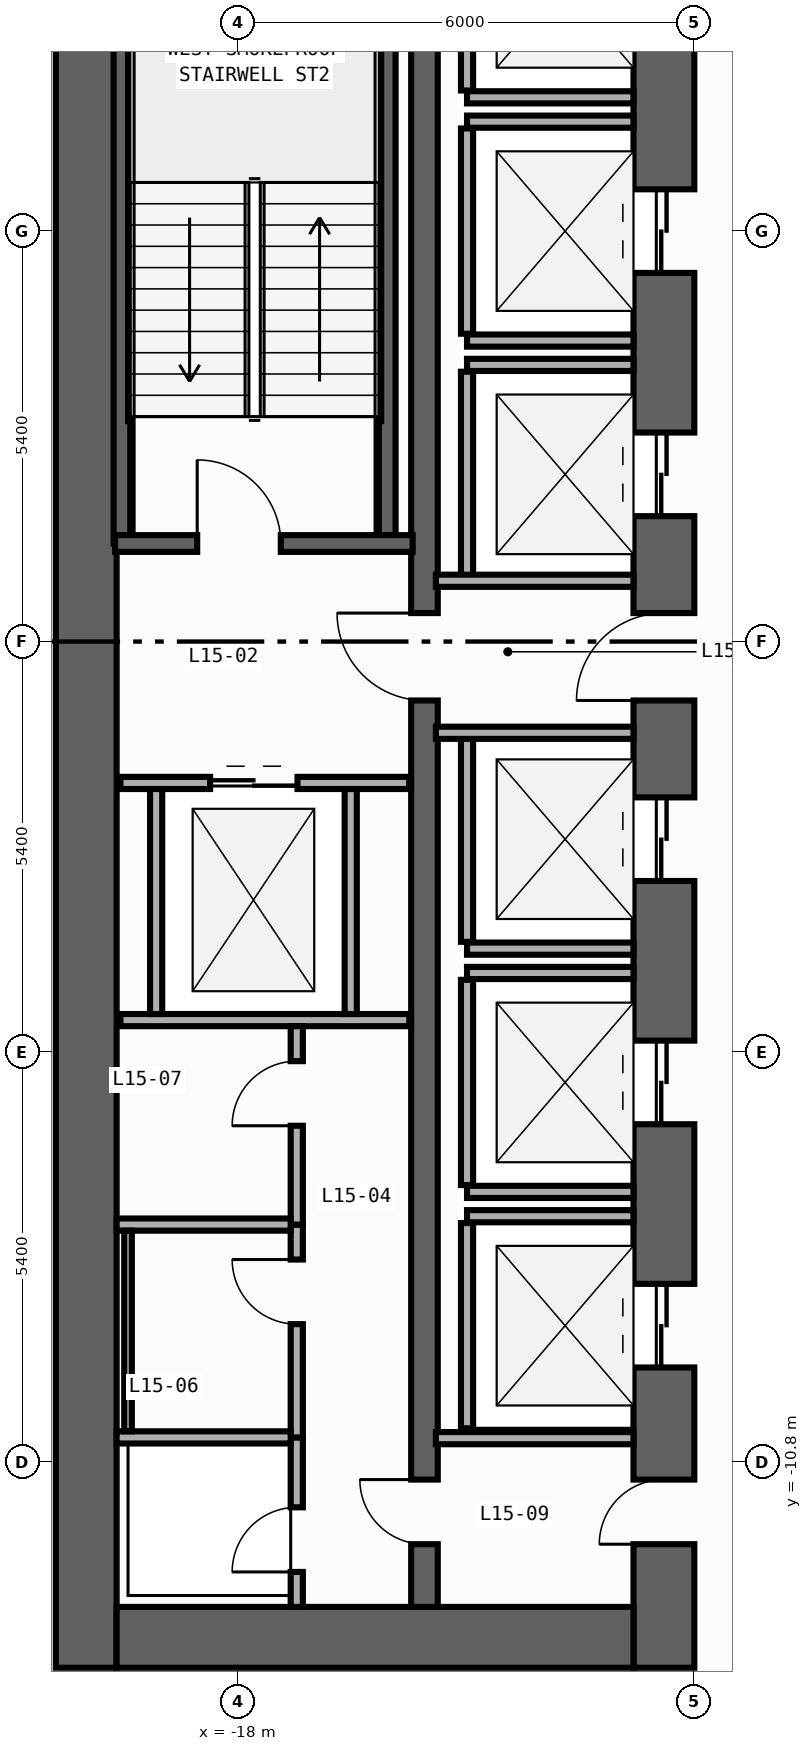
"""IFC4 building model, lengths in metres.
Left out: names, types, materials, properties, quantities, classifications, styles, units other than length and angle.
Written with IfcOpenShell. Run it as: python <this file> out.ifc"""

import sys

from ifc_helpers import new_model, si_unit, direction, frame, frame_2d, origin, place, context, subcontext, project, spatial, rectangle, extrude, element, fill, save


model = new_model("IFC4")
c1 = context("Model", 3, precision=1e-05, world=origin(), true_north=direction((0.0, 1.0)))
c2 = subcontext(c1, "Body", "Model", "MODEL_VIEW")
j1 = project(units=[si_unit("LENGTHUNIT", "METRE"), si_unit("PLANEANGLEUNIT", "RADIAN")], contexts=[c1])
p1 = place(None, origin())
s1 = spatial("IfcSite", under=j1, at=p1, CompositionType="ELEMENT")
p2 = place(p1, origin())
s2 = spatial("IfcBuilding", under=s1, at=p2, CompositionType="ELEMENT")
p3 = place(p2, frame((0.0, 0.0, 63.8)))
s3 = spatial("IfcBuildingStorey", under=s2, at=p3, CompositionType="ELEMENT", Elevation=63.8)
p4 = place(p3, frame((-20.0, -13.5, 0.0), z_axis=(0.0, 0.0, 1.0), x_axis=(0.0, 1.0, 0.0)))
e1 = element("IfcWall", 1, at=p4, inside=s3, PredefinedType="SHEAR", context=c2, shape_type="SweptSolid", body=[
    extrude(rectangle(XDim=27.0, YDim=0.8, at=frame_2d((13.5, 0.0))), origin(), (0.0, 0.0, 1.0), 3.94),
])
p5 = place(p3, frame((-12.4, -13.5, 0.0), z_axis=(0.0, 0.0, 1.0), x_axis=(0.0, 1.0, 0.0)))
e2 = element("IfcWall", 2, at=p5, inside=s3, PredefinedType="SHEAR", context=c2, shape_type="SweptSolid", body=[
    extrude(rectangle(XDim=27.0, YDim=0.8, at=frame_2d((13.5, 0.0))), origin(), (0.0, 0.0, 1.0), 3.94),
])
p6 = place(p5, frame((21.55, 0.0, 0.0)))
e3 = element("IfcOpeningElement", 3, at=p6, cuts=e2, PredefinedType="OPENING", context=c2, shape_type="SweptSolid", body=[
    extrude(rectangle(XDim=1.1, YDim=2.2, at=frame_2d((0.55, 1.1))), frame((0.0, 0.41, 0.0), z_axis=(0.0, -1.0, 0.0), x_axis=(1.0, 0.0, 0.0)), (0.0, 0.0, 1.0), 0.82),
])
p7 = place(p5, frame((18.35, 0.0, 0.0)))
e4 = element("IfcOpeningElement", 4, at=p7, cuts=e2, PredefinedType="OPENING", context=c2, shape_type="SweptSolid", body=[
    extrude(rectangle(XDim=1.1, YDim=2.2, at=frame_2d((0.55, 1.1))), frame((0.0, 0.41, 0.0), z_axis=(0.0, -1.0, 0.0), x_axis=(1.0, 0.0, 0.0)), (0.0, 0.0, 1.0), 0.82),
])
p8 = place(p5, frame((15.15, 0.0, 0.0)))
e5 = element("IfcOpeningElement", 5, at=p8, cuts=e2, PredefinedType="OPENING", context=c2, shape_type="SweptSolid", body=[
    extrude(rectangle(XDim=1.1, YDim=2.2, at=frame_2d((0.55, 1.1))), frame((0.0, 0.41, 0.0), z_axis=(0.0, -1.0, 0.0), x_axis=(1.0, 0.0, 0.0)), (0.0, 0.0, 1.0), 0.82),
])
p9 = place(p5, frame((10.35, 0.0, 0.0)))
e6 = element("IfcOpeningElement", 6, at=p9, cuts=e2, PredefinedType="OPENING", context=c2, shape_type="SweptSolid", body=[
    extrude(rectangle(XDim=1.1, YDim=2.2, at=frame_2d((0.55, 1.1))), frame((0.0, 0.41, 0.0), z_axis=(0.0, -1.0, 0.0), x_axis=(1.0, 0.0, 0.0)), (0.0, 0.0, 1.0), 0.82),
])
p10 = place(p5, frame((7.15, 0.0, 0.0)))
e7 = element("IfcOpeningElement", 7, at=p10, cuts=e2, PredefinedType="OPENING", context=c2, shape_type="SweptSolid", body=[
    extrude(rectangle(XDim=1.1, YDim=2.2, at=frame_2d((0.55, 1.1))), frame((0.0, 0.41, 0.0), z_axis=(0.0, -1.0, 0.0), x_axis=(1.0, 0.0, 0.0)), (0.0, 0.0, 1.0), 0.82),
])
p11 = place(p5, frame((3.95, 0.0, 0.0)))
e8 = element("IfcOpeningElement", 8, at=p11, cuts=e2, PredefinedType="OPENING", context=c2, shape_type="SweptSolid", body=[
    extrude(rectangle(XDim=1.1, YDim=2.2, at=frame_2d((0.55, 1.1))), frame((0.0, 0.41, 0.0), z_axis=(0.0, -1.0, 0.0), x_axis=(1.0, 0.0, 0.0)), (0.0, 0.0, 1.0), 0.82),
])
p12 = place(p5, frame((12.725, 0.0, 0.0)))
e9 = element("IfcOpeningElement", 9, at=p12, cuts=e2, PredefinedType="OPENING", context=c2, shape_type="SweptSolid", body=[
    extrude(rectangle(XDim=1.15, YDim=2.2, at=frame_2d((0.575, 1.1))), frame((0.0, 0.41, 0.0), z_axis=(0.0, -1.0, 0.0), x_axis=(1.0, 0.0, 0.0)), (0.0, 0.0, 1.0), 0.82),
])
p13 = place(p5, frame((1.625, 0.0, 0.0)))
e10 = element("IfcOpeningElement", 10, at=p13, cuts=e2, PredefinedType="OPENING", context=c2, shape_type="SweptSolid", body=[
    extrude(rectangle(XDim=0.85, YDim=2.1, at=frame_2d((0.425, 1.05))), frame((0.0, 0.41, 0.0), z_axis=(0.0, -1.0, 0.0), x_axis=(1.0, 0.0, 0.0)), (0.0, 0.0, 1.0), 0.82),
])
p14 = place(p3, frame((-19.6, -13.1, 0.0), z_axis=(0.0, 0.0, 1.0), x_axis=(1.0, 0.0, 0.0)))
e11 = element("IfcWall", 11, at=p14, inside=s3, PredefinedType="SHEAR", context=c2, shape_type="SweptSolid", body=[
    extrude(rectangle(XDim=6.8, YDim=0.8, at=frame_2d((3.4, 0.0))), origin(), (0.0, 0.0, 1.0), 3.94),
])
p15 = place(p3, frame((-15.55, -12.7, 0.0), z_axis=(0.0, 0.0, 1.0), x_axis=(0.0, 1.0, 0.0)))
e12 = element("IfcWall", 12, at=p15, inside=s3, PredefinedType="SHEAR", context=c2, shape_type="SweptSolid", body=[
    extrude(rectangle(XDim=25.4, YDim=0.35, at=frame_2d((12.7, 0.0))), origin(), (0.0, 0.0, 1.0), 3.94),
])
p16 = place(p15, frame((11.925, 0.0, 0.0)))
e13 = element("IfcOpeningElement", 13, at=p16, cuts=e12, PredefinedType="OPENING", context=c2, shape_type="SweptSolid", body=[
    extrude(rectangle(XDim=1.15, YDim=2.2, at=frame_2d((0.575, 1.1))), frame((0.0, 0.185, 0.0), z_axis=(0.0, -1.0, 0.0), x_axis=(1.0, 0.0, 0.0)), (0.0, 0.0, 1.0), 0.37),
])
p17 = place(p15, frame((0.825, 0.0, 0.0)))
e14 = element("IfcOpeningElement", 14, at=p17, cuts=e12, PredefinedType="OPENING", context=c2, shape_type="SweptSolid", body=[
    extrude(rectangle(XDim=0.85, YDim=2.1, at=frame_2d((0.425, 1.05))), frame((0.0, 0.185, 0.0), z_axis=(0.0, -1.0, 0.0), x_axis=(1.0, 0.0, 0.0)), (0.0, 0.0, 1.0), 0.37),
])
for number, where, z_axis, x_axis in (
    (15, (-16.04, 1.29, 0.0), (0.0, 0.0, 1.0), (0.0, 1.0, 0.0)),
    (16, (-19.53, 1.29, 0.0), (0.0, 0.0, 1.0), (0.0, 1.0, 0.0)),
):
    element("IfcWall", number, at=place(p3, frame(where, z_axis=z_axis, x_axis=x_axis)), inside=s3, PredefinedType="SHEAR", context=c2, shape_type="SweptSolid", body=[
        extrude(rectangle(XDim=11.3, YDim=0.22, at=frame_2d((5.65, 0.0))), origin(), (0.0, 0.0, 1.0), 3.94),
    ])
p18 = place(p3, frame((-19.62, 1.29, 0.0), z_axis=(0.0, 0.0, 1.0), x_axis=(1.0, 0.0, 0.0)))
e17 = element("IfcWall", 17, at=p18, inside=s3, PredefinedType="SHEAR", context=c2, shape_type="SweptSolid", body=[
    extrude(rectangle(XDim=3.915, YDim=0.22, at=frame_2d((1.958, 0.0))), origin(), (0.0, 0.0, 1.0), 3.94),
])
p19 = place(p18, frame((1.08, 0.0, 0.0)))
e18 = element("IfcOpeningElement", 18, at=p19, cuts=e17, PredefinedType="OPENING", context=c2, shape_type="SweptSolid", body=[
    extrude(rectangle(XDim=1.1, YDim=2.2, at=frame_2d((0.55, 1.1))), frame((0.0, 0.12, 0.0), z_axis=(0.0, -1.0, 0.0), x_axis=(1.0, 0.0, 0.0)), (0.0, 0.0, 1.0), 0.24),
])
p20 = place(p3, frame((-14.99, 7.16, 0.0), z_axis=(0.0, 0.0, 1.0), x_axis=(1.0, 0.0, 0.0)))
e19 = element("IfcWall", 19, at=p20, inside=s3, PredefinedType="STANDARD", context=c2, shape_type="SweptSolid", body=[
    extrude(rectangle(XDim=2.19, YDim=0.16, at=frame_2d((1.095, 0.0))), origin(), (0.0, 0.0, 1.0), 3.94),
])
p21 = place(p3, frame((-14.99, 7.25, 0.0), z_axis=(0.0, 0.0, 1.0), x_axis=(0.0, 1.0, 0.0)))
e20 = element("IfcWall", 20, at=p21, inside=s3, PredefinedType="STANDARD", context=c2, shape_type="SweptSolid", body=[
    extrude(rectangle(XDim=2.7, YDim=0.16, at=frame_2d((1.35, 0.0))), origin(), (0.0, 0.0, 1.0), 3.94),
])
for number, where, z_axis, x_axis in (
    (21, (-14.99, 3.96, 0.0), (0.0, 0.0, 1.0), (1.0, 0.0, 0.0)),
    (22, (-14.99, 6.84, 0.0), (0.0, 0.0, 1.0), (1.0, 0.0, 0.0)),
):
    element("IfcWall", number, at=place(p3, frame(where, z_axis=z_axis, x_axis=x_axis)), inside=s3, PredefinedType="STANDARD", context=c2, shape_type="SweptSolid", body=[
        extrude(rectangle(XDim=2.19, YDim=0.16, at=frame_2d((1.095, 0.0))), origin(), (0.0, 0.0, 1.0), 3.94),
    ])
p22 = place(p3, frame((-14.99, 4.05, 0.0), z_axis=(0.0, 0.0, 1.0), x_axis=(0.0, 1.0, 0.0)))
e23 = element("IfcWall", 23, at=p22, inside=s3, PredefinedType="STANDARD", context=c2, shape_type="SweptSolid", body=[
    extrude(rectangle(XDim=2.7, YDim=0.16, at=frame_2d((1.35, 0.0))), origin(), (0.0, 0.0, 1.0), 3.94),
])
p23 = place(p3, frame((-14.99, 3.64, 0.0), z_axis=(0.0, 0.0, 1.0), x_axis=(1.0, 0.0, 0.0)))
e24 = element("IfcWall", 24, at=p23, inside=s3, PredefinedType="STANDARD", context=c2, shape_type="SweptSolid", body=[
    extrude(rectangle(XDim=2.19, YDim=0.16, at=frame_2d((1.095, 0.0))), origin(), (0.0, 0.0, 1.0), 3.94),
])
p24 = place(p3, frame((-14.99, 0.85, 0.0), z_axis=(0.0, 0.0, 1.0), x_axis=(0.0, 1.0, 0.0)))
e25 = element("IfcWall", 25, at=p24, inside=s3, PredefinedType="STANDARD", context=c2, shape_type="SweptSolid", body=[
    extrude(rectangle(XDim=2.7, YDim=0.16, at=frame_2d((1.35, 0.0))), origin(), (0.0, 0.0, 1.0), 3.94),
])
p25 = place(p3, frame((-14.99, -4.04, 0.0), z_axis=(0.0, 0.0, 1.0), x_axis=(1.0, 0.0, 0.0)))
e26 = element("IfcWall", 26, at=p25, inside=s3, PredefinedType="STANDARD", context=c2, shape_type="SweptSolid", body=[
    extrude(rectangle(XDim=2.19, YDim=0.16, at=frame_2d((1.095, 0.0))), origin(), (0.0, 0.0, 1.0), 3.94),
])
p26 = place(p3, frame((-14.99, -3.95, 0.0), z_axis=(0.0, 0.0, 1.0), x_axis=(0.0, 1.0, 0.0)))
e27 = element("IfcWall", 27, at=p26, inside=s3, PredefinedType="STANDARD", context=c2, shape_type="SweptSolid", body=[
    extrude(rectangle(XDim=2.7, YDim=0.16, at=frame_2d((1.35, 0.0))), origin(), (0.0, 0.0, 1.0), 3.94),
])
for number, where, z_axis, x_axis in (
    (28, (-14.99, -7.24, 0.0), (0.0, 0.0, 1.0), (1.0, 0.0, 0.0)),
    (29, (-14.99, -4.36, 0.0), (0.0, 0.0, 1.0), (1.0, 0.0, 0.0)),
):
    element("IfcWall", number, at=place(p3, frame(where, z_axis=z_axis, x_axis=x_axis)), inside=s3, PredefinedType="STANDARD", context=c2, shape_type="SweptSolid", body=[
        extrude(rectangle(XDim=2.19, YDim=0.16, at=frame_2d((1.095, 0.0))), origin(), (0.0, 0.0, 1.0), 3.94),
    ])
p27 = place(p3, frame((-14.99, -7.15, 0.0), z_axis=(0.0, 0.0, 1.0), x_axis=(0.0, 1.0, 0.0)))
e30 = element("IfcWall", 30, at=p27, inside=s3, PredefinedType="STANDARD", context=c2, shape_type="SweptSolid", body=[
    extrude(rectangle(XDim=2.7, YDim=0.16, at=frame_2d((1.35, 0.0))), origin(), (0.0, 0.0, 1.0), 3.94),
])
p28 = place(p3, frame((-14.99, -7.56, 0.0), z_axis=(0.0, 0.0, 1.0), x_axis=(1.0, 0.0, 0.0)))
e31 = element("IfcWall", 31, at=p28, inside=s3, PredefinedType="STANDARD", context=c2, shape_type="SweptSolid", body=[
    extrude(rectangle(XDim=2.19, YDim=0.16, at=frame_2d((1.095, 0.0))), origin(), (0.0, 0.0, 1.0), 3.94),
])
p29 = place(p3, frame((-14.99, -10.35, 0.0), z_axis=(0.0, 0.0, 1.0), x_axis=(0.0, 1.0, 0.0)))
e32 = element("IfcWall", 32, at=p29, inside=s3, PredefinedType="STANDARD", context=c2, shape_type="SweptSolid", body=[
    extrude(rectangle(XDim=2.7, YDim=0.16, at=frame_2d((1.35, 0.0))), origin(), (0.0, 0.0, 1.0), 3.94),
])
p30 = place(p3, frame((-19.55, -1.86, 0.0), z_axis=(0.0, 0.0, 1.0), x_axis=(1.0, 0.0, 0.0)))
e33 = element("IfcWall", 33, at=p30, inside=s3, PredefinedType="STANDARD", context=c2, shape_type="SweptSolid", body=[
    extrude(rectangle(XDim=3.8, YDim=0.16, at=frame_2d((1.9, 0.0))), origin(), (0.0, 0.0, 1.0), 3.94),
])
p31 = place(p30, frame((1.18, 0.0, 0.0)))
e34 = element("IfcOpeningElement", 34, at=p31, cuts=e33, PredefinedType="OPENING", context=c2, shape_type="SweptSolid", body=[
    extrude(rectangle(XDim=1.15, YDim=2.2, at=frame_2d((0.575, 1.1))), frame((0.0, 0.09, 0.0), z_axis=(0.0, -1.0, 0.0), x_axis=(1.0, 0.0, 0.0)), (0.0, 0.0, 1.0), 0.18),
])
p32 = place(p3, frame((-19.55, -4.98, 0.0), z_axis=(0.0, 0.0, 1.0), x_axis=(1.0, 0.0, 0.0)))
e35 = element("IfcWall", 35, at=p32, inside=s3, PredefinedType="STANDARD", context=c2, shape_type="SweptSolid", body=[
    extrude(rectangle(XDim=3.8, YDim=0.16, at=frame_2d((1.9, 0.0))), origin(), (0.0, 0.0, 1.0), 3.94),
])
for number, where, z_axis, x_axis in (
    (36, (-19.08, -4.9, 0.0), (0.0, 0.0, 1.0), (0.0, 1.0, 0.0)),
    (37, (-16.52, -4.9, 0.0), (0.0, 0.0, 1.0), (0.0, 1.0, 0.0)),
):
    element("IfcWall", number, at=place(p3, frame(where, z_axis=z_axis, x_axis=x_axis)), inside=s3, PredefinedType="STANDARD", context=c2, shape_type="SweptSolid", body=[
        extrude(rectangle(XDim=2.96, YDim=0.16, at=frame_2d((1.48, 0.0))), origin(), (0.0, 0.0, 1.0), 3.94),
    ])
for number, where, z_axis, x_axis in (
    (38, (-15.4, 0.8, 0.0), (0.0, 0.0, 1.0), (1.0, 0.0, 0.0)),
    (39, (-15.4, -1.2, 0.0), (0.0, 0.0, 1.0), (1.0, 0.0, 0.0)),
    (40, (-15.4, -10.48, 0.0), (0.0, 0.0, 1.0), (1.0, 0.0, 0.0)),
):
    element("IfcWall", number, at=place(p3, frame(where, z_axis=z_axis, x_axis=x_axis)), inside=s3, PredefinedType="STANDARD", context=c2, shape_type="SweptSolid", body=[
        extrude(rectangle(XDim=2.6, YDim=0.16, at=frame_2d((1.3, 0.0))), origin(), (0.0, 0.0, 1.0), 3.94),
    ])
p33 = place(p3, frame((-17.23, -12.7, 0.0), z_axis=(0.0, 0.0, 1.0), x_axis=(0.0, 1.0, 0.0)))
e41 = element("IfcWall", 41, at=p33, inside=s3, PredefinedType="PARTITIONING", context=c2, shape_type="SweptSolid", body=[
    extrude(rectangle(XDim=2.23, YDim=0.16, at=frame_2d((1.115, 0.0))), origin(), (0.0, 0.0, 1.0), 3.94),
])
p34 = place(p33, frame((0.46, 0.0, 0.0)))
e42 = element("IfcOpeningElement", 42, at=p34, cuts=e41, PredefinedType="OPENING", context=c2, shape_type="SweptSolid", body=[
    extrude(rectangle(XDim=0.85, YDim=2.1, at=frame_2d((0.425, 1.05))), frame((0.0, 0.09, 0.0), z_axis=(0.0, -1.0, 0.0), x_axis=(1.0, 0.0, 0.0)), (0.0, 0.0, 1.0), 0.18),
])
p35 = place(p3, frame((-17.23, -10.47, 0.0), z_axis=(0.0, 0.0, 1.0), x_axis=(0.0, 1.0, 0.0)))
e43 = element("IfcWall", 43, at=p35, inside=s3, PredefinedType="PARTITIONING", context=c2, shape_type="SweptSolid", body=[
    extrude(rectangle(XDim=2.8, YDim=0.16, at=frame_2d((1.4, 0.0))), origin(), (0.0, 0.0, 1.0), 3.94),
])
p36 = place(p35, frame((1.49, 0.0, 0.0)))
e44 = element("IfcOpeningElement", 44, at=p36, cuts=e43, PredefinedType="OPENING", context=c2, shape_type="SweptSolid", body=[
    extrude(rectangle(XDim=0.85, YDim=2.1, at=frame_2d((0.425, 1.05))), frame((0.0, 0.09, 0.0), z_axis=(0.0, -1.0, 0.0), x_axis=(1.0, 0.0, 0.0)), (0.0, 0.0, 1.0), 0.18),
])
p37 = place(p3, frame((-17.23, -7.67, 0.0), z_axis=(0.0, 0.0, 1.0), x_axis=(0.0, 1.0, 0.0)))
e45 = element("IfcWall", 45, at=p37, inside=s3, PredefinedType="PARTITIONING", context=c2, shape_type="SweptSolid", body=[
    extrude(rectangle(XDim=2.61, YDim=0.16, at=frame_2d((1.305, 0.0))), origin(), (0.0, 0.0, 1.0), 3.94),
])
p38 = place(p37, frame((1.3, 0.0, 0.0)))
e46 = element("IfcOpeningElement", 46, at=p38, cuts=e45, PredefinedType="OPENING", context=c2, shape_type="SweptSolid", body=[
    extrude(rectangle(XDim=0.85, YDim=2.1, at=frame_2d((0.425, 1.05))), frame((0.0, 0.09, 0.0), z_axis=(0.0, -1.0, 0.0), x_axis=(1.0, 0.0, 0.0)), (0.0, 0.0, 1.0), 0.18),
])
for number, where, z_axis, x_axis in (
    (47, (-19.6, -10.47, 0.0), (0.0, 0.0, 1.0), (1.0, 0.0, 0.0)),
    (48, (-19.6, -7.67, 0.0), (0.0, 0.0, 1.0), (1.0, 0.0, 0.0)),
):
    element("IfcWall", number, at=place(p3, frame(where, z_axis=z_axis, x_axis=x_axis)), inside=s3, PredefinedType="PARTITIONING", context=c2, shape_type="SweptSolid", body=[
        extrude(rectangle(XDim=2.29, YDim=0.16, at=frame_2d((1.145, 0.0))), origin(), (0.0, 0.0, 1.0), 3.94),
    ])
p39 = place(p3, frame((-19.45, -10.39, 0.0), z_axis=(0.0, 0.0, 1.0), x_axis=(0.0, 1.0, 0.0)))
e49 = element("IfcWall", 49, at=p39, inside=s3, PredefinedType="PARTITIONING", context=c2, shape_type="SweptSolid", body=[
    extrude(rectangle(XDim=2.64, YDim=0.1, at=frame_2d((1.32, 0.0))), origin(), (0.0, 0.0, 1.0), 3.94),
])
p40 = place(p19, origin())
e50 = element("IfcDoor", 50, at=p40, inside=s3, OperationType="SINGLE_SWING_LEFT", PredefinedType="DOOR", context=c2, shape_type="SweptSolid", body=[
    extrude(rectangle(XDim=1.1, YDim=2.2, at=frame_2d((0.55, 1.1))), frame((0.0, 0.025, 0.0), z_axis=(0.0, -1.0, 0.0), x_axis=(1.0, 0.0, 0.0)), (0.0, 0.0, 1.0), 0.05),
])
fill(e18, e50)
p41 = place(p7, origin())
e51 = element("IfcDoor", 51, at=p41, inside=s3, OperationType="DOUBLE_DOOR_SLIDING", PredefinedType="DOOR", context=c2, shape_type="SweptSolid", body=[
    extrude(rectangle(XDim=1.1, YDim=2.2, at=frame_2d((0.55, 1.1))), frame((0.0, 0.025, 0.0), z_axis=(0.0, -1.0, 0.0), x_axis=(1.0, 0.0, 0.0)), (0.0, 0.0, 1.0), 0.05),
])
fill(e4, e51)
p42 = place(p8, origin())
e52 = element("IfcDoor", 52, at=p42, inside=s3, OperationType="DOUBLE_DOOR_SLIDING", PredefinedType="DOOR", context=c2, shape_type="SweptSolid", body=[
    extrude(rectangle(XDim=1.1, YDim=2.2, at=frame_2d((0.55, 1.1))), frame((0.0, 0.025, 0.0), z_axis=(0.0, -1.0, 0.0), x_axis=(1.0, 0.0, 0.0)), (0.0, 0.0, 1.0), 0.05),
])
fill(e5, e52)
p43 = place(p9, origin())
e53 = element("IfcDoor", 53, at=p43, inside=s3, OperationType="DOUBLE_DOOR_SLIDING", PredefinedType="DOOR", context=c2, shape_type="SweptSolid", body=[
    extrude(rectangle(XDim=1.1, YDim=2.2, at=frame_2d((0.55, 1.1))), frame((0.0, 0.025, 0.0), z_axis=(0.0, -1.0, 0.0), x_axis=(1.0, 0.0, 0.0)), (0.0, 0.0, 1.0), 0.05),
])
fill(e6, e53)
p44 = place(p10, origin())
e54 = element("IfcDoor", 54, at=p44, inside=s3, OperationType="DOUBLE_DOOR_SLIDING", PredefinedType="DOOR", context=c2, shape_type="SweptSolid", body=[
    extrude(rectangle(XDim=1.1, YDim=2.2, at=frame_2d((0.55, 1.1))), frame((0.0, 0.025, 0.0), z_axis=(0.0, -1.0, 0.0), x_axis=(1.0, 0.0, 0.0)), (0.0, 0.0, 1.0), 0.05),
])
fill(e7, e54)
p45 = place(p11, origin())
e55 = element("IfcDoor", 55, at=p45, inside=s3, OperationType="DOUBLE_DOOR_SLIDING", PredefinedType="DOOR", context=c2, shape_type="SweptSolid", body=[
    extrude(rectangle(XDim=1.1, YDim=2.2, at=frame_2d((0.55, 1.1))), frame((0.0, 0.025, 0.0), z_axis=(0.0, -1.0, 0.0), x_axis=(1.0, 0.0, 0.0)), (0.0, 0.0, 1.0), 0.05),
])
fill(e8, e55)
p46 = place(p12, origin())
e56 = element("IfcDoor", 56, at=p46, inside=s3, OperationType="SINGLE_SWING_LEFT", PredefinedType="DOOR", context=c2, shape_type="SweptSolid", body=[
    extrude(rectangle(XDim=1.15, YDim=2.2, at=frame_2d((0.575, 1.1))), frame((0.0, 0.025, 0.0), z_axis=(0.0, -1.0, 0.0), x_axis=(1.0, 0.0, 0.0)), (0.0, 0.0, 1.0), 0.05),
])
fill(e9, e56)
p47 = place(p16, origin())
e57 = element("IfcDoor", 57, at=p47, inside=s3, OperationType="SINGLE_SWING_RIGHT", PredefinedType="DOOR", context=c2, shape_type="SweptSolid", body=[
    extrude(rectangle(XDim=1.15, YDim=2.2, at=frame_2d((0.575, 1.1))), frame((0.0, 0.025, 0.0), z_axis=(0.0, -1.0, 0.0), x_axis=(1.0, 0.0, 0.0)), (0.0, 0.0, 1.0), 0.05),
])
fill(e13, e57)
p48 = place(p13, origin())
e58 = element("IfcDoor", 58, at=p48, inside=s3, OperationType="SINGLE_SWING_LEFT", PredefinedType="DOOR", context=c2, shape_type="SweptSolid", body=[
    extrude(rectangle(XDim=0.85, YDim=2.1, at=frame_2d((0.425, 1.05))), frame((0.0, 0.025, 0.0), z_axis=(0.0, -1.0, 0.0), x_axis=(1.0, 0.0, 0.0)), (0.0, 0.0, 1.0), 0.05),
])
fill(e10, e58)
p49 = place(p17, origin())
e59 = element("IfcDoor", 59, at=p49, inside=s3, OperationType="SINGLE_SWING_RIGHT", PredefinedType="DOOR", context=c2, shape_type="SweptSolid", body=[
    extrude(rectangle(XDim=0.85, YDim=2.1, at=frame_2d((0.425, 1.05))), frame((0.0, 0.025, 0.0), z_axis=(0.0, -1.0, 0.0), x_axis=(1.0, 0.0, 0.0)), (0.0, 0.0, 1.0), 0.05),
])
fill(e14, e59)
p50 = place(p31, origin())
e60 = element("IfcDoor", 60, at=p50, inside=s3, OperationType="DOUBLE_DOOR_SLIDING", PredefinedType="DOOR", context=c2, shape_type="SweptSolid", body=[
    extrude(rectangle(XDim=1.15, YDim=2.2, at=frame_2d((0.575, 1.1))), frame((0.0, 0.025, 0.0), z_axis=(0.0, -1.0, 0.0), x_axis=(1.0, 0.0, 0.0)), (0.0, 0.0, 1.0), 0.05),
])
fill(e34, e60)
p51 = place(p34, origin())
e61 = element("IfcDoor", 61, at=p51, inside=s3, OperationType="SINGLE_SWING_LEFT", PredefinedType="DOOR", context=c2, shape_type="SweptSolid", body=[
    extrude(rectangle(XDim=0.85, YDim=2.1, at=frame_2d((0.425, 1.05))), frame((0.0, 0.025, 0.0), z_axis=(0.0, -1.0, 0.0), x_axis=(1.0, 0.0, 0.0)), (0.0, 0.0, 1.0), 0.05),
])
fill(e42, e61)
p52 = place(p36, origin())
e62 = element("IfcDoor", 62, at=p52, inside=s3, OperationType="SINGLE_SWING_RIGHT", PredefinedType="DOOR", context=c2, shape_type="SweptSolid", body=[
    extrude(rectangle(XDim=0.85, YDim=2.1, at=frame_2d((0.425, 1.05))), frame((0.0, 0.025, 0.0), z_axis=(0.0, -1.0, 0.0), x_axis=(1.0, 0.0, 0.0)), (0.0, 0.0, 1.0), 0.05),
])
fill(e44, e62)
p53 = place(p38, origin())
e63 = element("IfcDoor", 63, at=p53, inside=s3, OperationType="SINGLE_SWING_LEFT", PredefinedType="DOOR", context=c2, shape_type="SweptSolid", body=[
    extrude(rectangle(XDim=0.85, YDim=2.1, at=frame_2d((0.425, 1.05))), frame((0.0, 0.025, 0.0), z_axis=(0.0, -1.0, 0.0), x_axis=(1.0, 0.0, 0.0)), (0.0, 0.0, 1.0), 0.05),
])
fill(e46, e63)
save(model, sys.argv[1])
